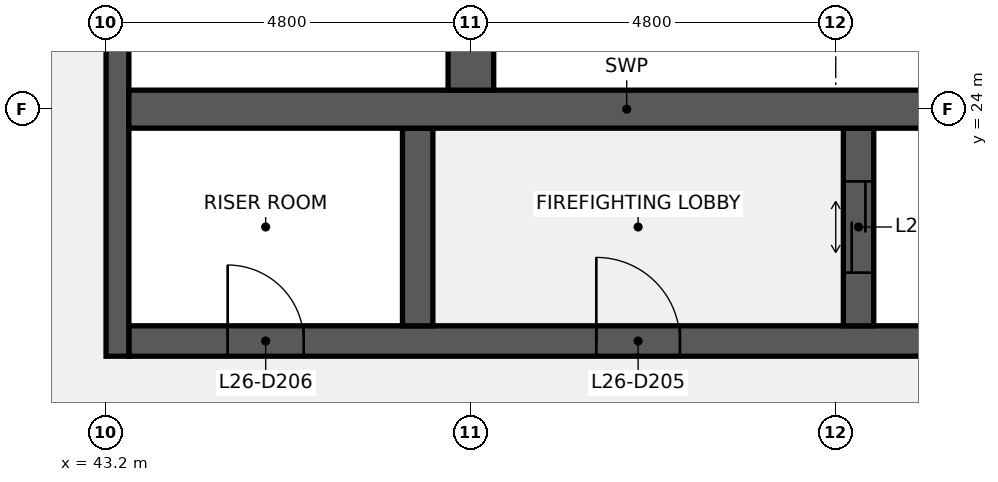
"""IFC4 building model, lengths in metres.
Left out: names, types, materials, properties, quantities, classifications, styles, units other than length and angle.
Written with IfcOpenShell. Run it as: python <this file> out.ifc"""

import sys

from ifc_helpers import new_model, si_unit, direction, frame, frame_2d, origin, place, context, subcontext, project, spatial, rectangle, extrude, element, fill, save


model = new_model("IFC4")
c1 = context("Model", 3, precision=1e-05, world=origin(), true_north=direction((0.0, 1.0)))
c2 = subcontext(c1, "Body", "Model", "MODEL_VIEW")
j1 = project(units=[si_unit("LENGTHUNIT", "METRE"), si_unit("PLANEANGLEUNIT", "RADIAN")], contexts=[c1])
p1 = place(None, origin())
s1 = spatial("IfcSite", under=j1, at=p1, CompositionType="ELEMENT")
p2 = place(p1, origin())
s2 = spatial("IfcBuilding", under=s1, at=p2, CompositionType="ELEMENT")
p3 = place(p2, frame((0.0, 0.0, 124.1)))
s3 = spatial("IfcBuildingStorey", under=s2, at=p3, CompositionType="ELEMENT", Elevation=124.1)
p4 = place(p3, frame((43.5, 20.95, 0.0), z_axis=(0.0, 0.0, 1.0), x_axis=(1.0, 0.0, 0.0)))
e1 = element("IfcWall", 1, at=p4, inside=s3, PredefinedType="SHEAR", context=c2, shape_type="SweptSolid", body=[
    extrude(rectangle(XDim=13.1, YDim=0.4, at=frame_2d((6.55, 0.0))), origin(), (0.0, 0.0, 1.0), 3.84),
])
p5 = place(p4, frame((6.15, 0.0, 0.0)))
e2 = element("IfcOpeningElement", 2, at=p5, cuts=e1, PredefinedType="OPENING", context=c2, shape_type="SweptSolid", body=[
    extrude(rectangle(XDim=1.1, YDim=2.1, at=frame_2d((0.55, 1.05))), frame((0.0, 0.21, 0.0), z_axis=(0.0, -1.0, 0.0), x_axis=(1.0, 0.0, 0.0)), (0.0, 0.0, 1.0), 0.42),
])
p6 = place(p4, frame((1.3, 0.0, 0.0)))
e3 = element("IfcOpeningElement", 3, at=p6, cuts=e1, PredefinedType="OPENING", context=c2, shape_type="SweptSolid", body=[
    extrude(rectangle(XDim=1.0, YDim=2.1, at=frame_2d((0.5, 1.05))), frame((0.0, 0.21, 0.0), z_axis=(0.0, -1.0, 0.0), x_axis=(1.0, 0.0, 0.0)), (0.0, 0.0, 1.0), 0.42),
])
p7 = place(p3, frame((43.35, 20.75, 0.0), z_axis=(0.0, 0.0, 1.0), x_axis=(0.0, 1.0, 0.0)))
e4 = element("IfcWall", 4, at=p7, inside=s3, PredefinedType="SHEAR", context=c2, shape_type="SweptSolid", body=[
    extrude(rectangle(XDim=6.5, YDim=0.3, at=frame_2d((3.25, 0.0))), origin(), (0.0, 0.0, 1.0), 3.84),
])
p8 = place(p3, frame((53.1, 21.15, 0.0), z_axis=(0.0, 0.0, 1.0), x_axis=(0.0, 1.0, 0.0)))
e5 = element("IfcWall", 5, at=p8, inside=s3, PredefinedType="SHEAR", context=c2, shape_type="SweptSolid", body=[
    extrude(rectangle(XDim=2.6, YDim=0.4, at=frame_2d((1.3, 0.0))), origin(), (0.0, 0.0, 1.0), 3.84),
])
p9 = place(p8, frame((0.7, 0.0, 0.0)))
e6 = element("IfcOpeningElement", 6, at=p9, cuts=e5, PredefinedType="OPENING", context=c2, shape_type="SweptSolid", body=[
    extrude(rectangle(XDim=1.2, YDim=2.1, at=frame_2d((0.6, 1.05))), frame((0.0, 0.21, 0.0), z_axis=(0.0, -1.0, 0.0), x_axis=(1.0, 0.0, 0.0)), (0.0, 0.0, 1.0), 0.42),
])
p10 = place(p3, frame((47.3, 21.15, 0.0), z_axis=(0.0, 0.0, 1.0), x_axis=(0.0, 1.0, 0.0)))
e7 = element("IfcWall", 7, at=p10, inside=s3, PredefinedType="SHEAR", context=c2, shape_type="SweptSolid", body=[
    extrude(rectangle(XDim=2.6, YDim=0.4, at=frame_2d((1.3, 0.0))), origin(), (0.0, 0.0, 1.0), 3.84),
])
p11 = place(p3, frame((43.5, 24.0, 0.0), z_axis=(0.0, 0.0, 1.0), x_axis=(1.0, 0.0, 0.0)))
e8 = element("IfcWall", 8, at=p11, inside=s3, PredefinedType="SHEAR", context=c2, shape_type="SweptSolid", body=[
    extrude(rectangle(XDim=13.1, YDim=0.5, at=frame_2d((6.55, 0.0))), origin(), (0.0, 0.0, 1.0), 3.84),
])
p12 = place(p3, frame((48.0, 24.25, 0.0), z_axis=(0.0, 0.0, 1.0), x_axis=(0.0, 1.0, 0.0)))
e9 = element("IfcWall", 9, at=p12, inside=s3, PredefinedType="SHEAR", context=c2, shape_type="SweptSolid", body=[
    extrude(rectangle(XDim=2.6, YDim=0.6, at=frame_2d((1.3, 0.0))), origin(), (0.0, 0.0, 1.0), 3.84),
])
p13 = place(p5, origin())
e10 = element("IfcDoor", 10, at=p13, inside=s3, OperationType="SINGLE_SWING_LEFT", PredefinedType="DOOR", context=c2, shape_type="SweptSolid", body=[
    extrude(rectangle(XDim=1.1, YDim=2.1, at=frame_2d((0.55, 1.05))), frame((0.0, 0.025, 0.0), z_axis=(0.0, -1.0, 0.0), x_axis=(1.0, 0.0, 0.0)), (0.0, 0.0, 1.0), 0.05),
])
fill(e2, e10)
p14 = place(p6, origin())
e11 = element("IfcDoor", 11, at=p14, inside=s3, OperationType="SINGLE_SWING_LEFT", PredefinedType="DOOR", context=c2, shape_type="SweptSolid", body=[
    extrude(rectangle(XDim=1.0, YDim=2.1, at=frame_2d((0.5, 1.05))), frame((0.0, 0.025, 0.0), z_axis=(0.0, -1.0, 0.0), x_axis=(1.0, 0.0, 0.0)), (0.0, 0.0, 1.0), 0.05),
])
fill(e3, e11)
p15 = place(p9, origin())
e12 = element("IfcDoor", 12, at=p15, inside=s3, OperationType="DOUBLE_DOOR_SLIDING", PredefinedType="DOOR", context=c2, shape_type="SweptSolid", body=[
    extrude(rectangle(XDim=1.2, YDim=2.1, at=frame_2d((0.6, 1.05))), frame((0.0, 0.025, 0.0), z_axis=(0.0, -1.0, 0.0), x_axis=(1.0, 0.0, 0.0)), (0.0, 0.0, 1.0), 0.05),
])
fill(e6, e12)
save(model, sys.argv[1])
